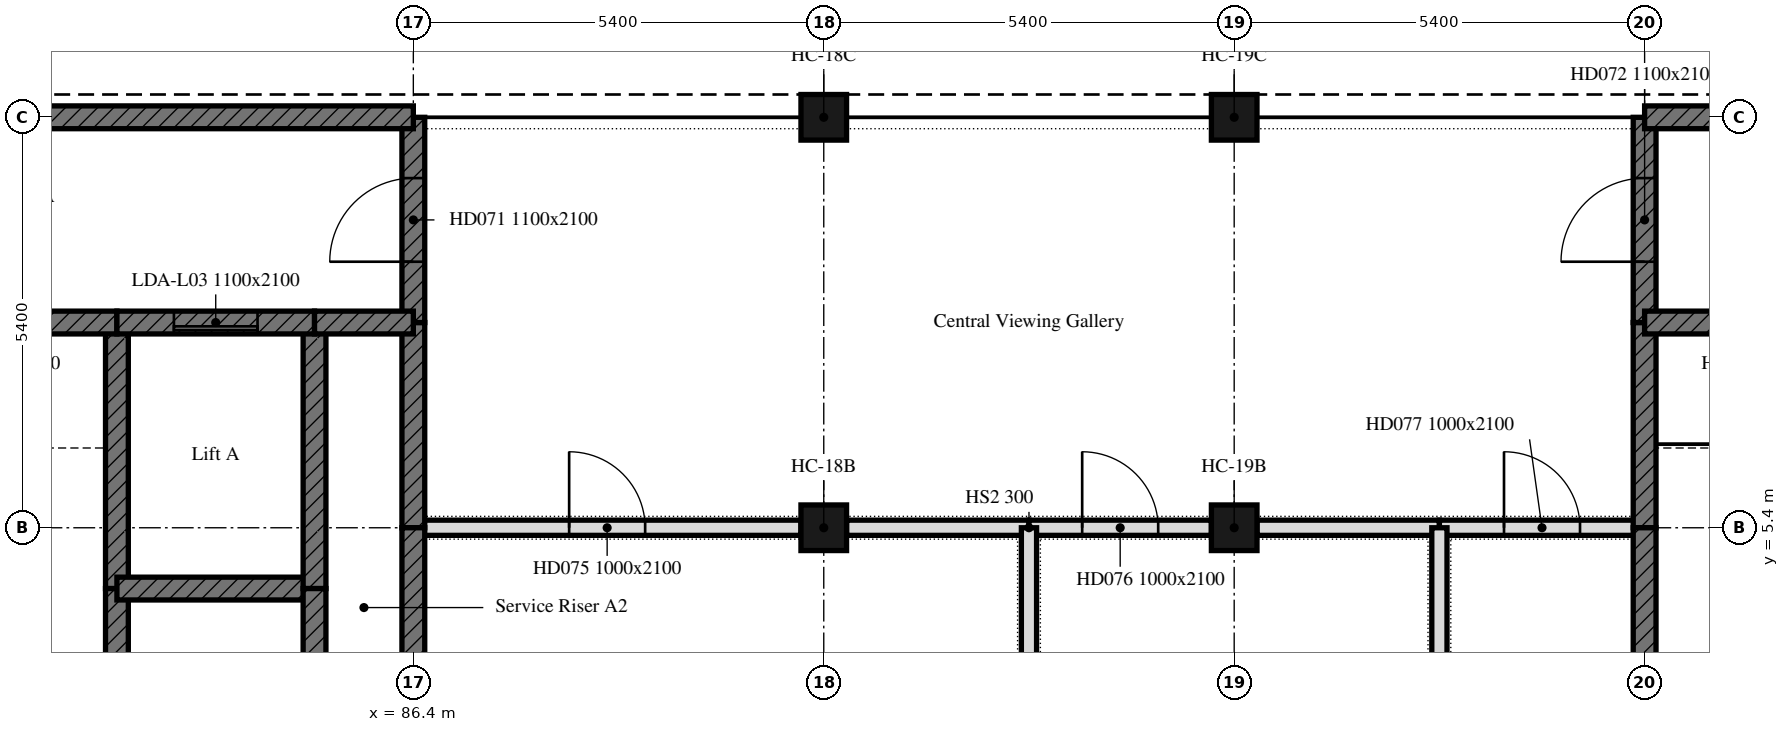
"""IFC4 building model, lengths in metres.
Left out: names, types, materials, properties, quantities, classifications, styles, units other than length and angle.
Written with IfcOpenShell. Run it as: python <this file> out.ifc"""

import sys

from ifc_helpers import new_model, si_unit, direction, frame, frame_2d, origin, origin_2d, place, context, subcontext, project, spatial, polyline, rectangle, outline, extrude, element, fill, save


model = new_model("IFC4")
c1 = context("Model", 3, precision=1e-05, world=origin(), true_north=direction((0.0, 1.0)))
c2 = subcontext(c1, "Body", "Model", "MODEL_VIEW")
j1 = project(units=[si_unit("LENGTHUNIT", "METRE"), si_unit("PLANEANGLEUNIT", "RADIAN")], contexts=[c1])
p1 = place(None, origin())
s1 = spatial("IfcSite", under=j1, at=p1, CompositionType="ELEMENT")
p2 = place(p1, origin())
s2 = spatial("IfcBuilding", under=s1, at=p2, CompositionType="ELEMENT")
p3 = place(p2, frame((0.0, 0.0, 19.8)))
s3 = spatial("IfcBuildingStorey", under=s2, at=p3, CompositionType="ELEMENT", Elevation=19.8)
for number, where, z_axis, x_axis in (
    (1, (91.8, 5.4, 0.0), (0.0, 0.0, 1.0), (1.0, 0.0, 0.0)),
    (2, (91.8, 10.8, 0.0), (0.0, 0.0, 1.0), (1.0, 0.0, 0.0)),
    (3, (97.2, 5.4, 0.0), (0.0, 0.0, 1.0), (1.0, 0.0, 0.0)),
    (4, (97.2, 10.8, 0.0), (0.0, 0.0, 1.0), (1.0, 0.0, 0.0)),
):
    element("IfcColumn", number, at=place(p3, frame(where, z_axis=z_axis, x_axis=x_axis)), inside=s3, PredefinedType="COLUMN", context=c2, shape_type="SweptSolid", body=[
        extrude(rectangle(XDim=0.6, YDim=0.6, at=origin_2d()), origin(), (0.0, 0.0, 1.0), 4.8),
    ])
p4 = place(p3, frame((86.4, 5.4, 0.0), z_axis=(0.0, 0.0, 1.0), x_axis=(1.0, 0.0, 0.0)))
e5 = element("IfcWall", 5, at=p4, inside=s3, PredefinedType="PARTITIONING", context=c2, shape_type="SweptSolid", body=[
    extrude(rectangle(XDim=5.1, YDim=0.2, at=frame_2d((2.55, 0.0))), origin(), (0.0, 0.0, 1.0), 5.317),
])
p5 = place(p4, frame((2.05, 0.0, 0.0)))
e6 = element("IfcOpeningElement", 6, at=p5, cuts=e5, PredefinedType="OPENING", context=c2, shape_type="SweptSolid", body=[
    extrude(rectangle(XDim=1.0, YDim=2.1, at=frame_2d((0.5, 1.05))), frame((0.0, 0.1, 0.0), z_axis=(0.0, -1.0, 0.0), x_axis=(1.0, 0.0, 0.0)), (0.0, 0.0, 1.0), 0.2),
])
p6 = place(p3, frame((92.1, 5.4, 0.0), z_axis=(0.0, 0.0, 1.0), x_axis=(1.0, 0.0, 0.0)))
e7 = element("IfcWall", 7, at=p6, inside=s3, PredefinedType="PARTITIONING", context=c2, shape_type="SweptSolid", body=[
    extrude(rectangle(XDim=2.4, YDim=0.2, at=frame_2d((1.2, 0.0))), origin(), (0.0, 0.0, 1.0), 5.317),
])
p7 = place(p3, frame((94.5, 5.4, 0.0), z_axis=(0.0, 0.0, 1.0), x_axis=(1.0, 0.0, 0.0)))
e8 = element("IfcWall", 8, at=p7, inside=s3, PredefinedType="PARTITIONING", context=c2, shape_type="SweptSolid", body=[
    extrude(rectangle(XDim=2.4, YDim=0.2, at=frame_2d((1.2, 0.0))), origin(), (0.0, 0.0, 1.0), 5.317),
])
p8 = place(p7, frame((0.7, 0.0, 0.0)))
e9 = element("IfcOpeningElement", 9, at=p8, cuts=e8, PredefinedType="OPENING", context=c2, shape_type="SweptSolid", body=[
    extrude(rectangle(XDim=1.0, YDim=2.1, at=frame_2d((0.5, 1.05))), frame((0.0, 0.1, 0.0), z_axis=(0.0, -1.0, 0.0), x_axis=(1.0, 0.0, 0.0)), (0.0, 0.0, 1.0), 0.2),
])
p9 = place(p3, frame((97.5, 5.4, 0.0), z_axis=(0.0, 0.0, 1.0), x_axis=(1.0, 0.0, 0.0)))
e10 = element("IfcWall", 10, at=p9, inside=s3, PredefinedType="PARTITIONING", context=c2, shape_type="SweptSolid", body=[
    extrude(rectangle(XDim=2.4, YDim=0.2, at=frame_2d((1.2, 0.0))), origin(), (0.0, 0.0, 1.0), 5.317),
])
p10 = place(p3, frame((99.9, 5.4, 0.0), z_axis=(0.0, 0.0, 1.0), x_axis=(1.0, 0.0, 0.0)))
e11 = element("IfcWall", 11, at=p10, inside=s3, PredefinedType="PARTITIONING", context=c2, shape_type="SweptSolid", body=[
    extrude(rectangle(XDim=2.7, YDim=0.2, at=frame_2d((1.35, 0.0))), origin(), (0.0, 0.0, 1.0), 5.317),
])
p11 = place(p10, frame((0.85, 0.0, 0.0)))
e12 = element("IfcOpeningElement", 12, at=p11, cuts=e11, PredefinedType="OPENING", context=c2, shape_type="SweptSolid", body=[
    extrude(rectangle(XDim=1.0, YDim=2.1, at=frame_2d((0.5, 1.05))), frame((0.0, 0.1, 0.0), z_axis=(0.0, -1.0, 0.0), x_axis=(1.0, 0.0, 0.0)), (0.0, 0.0, 1.0), 0.2),
])
p12 = place(p3, frame((86.4, 5.4, 0.0), z_axis=(0.0, 0.0, 1.0), x_axis=(0.0, 1.0, 0.0)))
e13 = element("IfcWall", 13, at=p12, inside=s3, PredefinedType="SHEAR", context=c2, shape_type="SweptSolid", body=[
    extrude(outline(polyline([(0.0, 0.0), (2.7, 0.0), (2.7, 6.067), (0.0, 5.344), (0.0, 0.0)])), frame((0.0, 0.15, 0.0), z_axis=(0.0, -1.0, 0.0), x_axis=(1.0, 0.0, 0.0)), (0.0, 0.0, 1.0), 0.3),
])
p13 = place(p3, frame((86.4, 8.1, 0.0), z_axis=(0.0, 0.0, 1.0), x_axis=(0.0, 1.0, 0.0)))
e14 = element("IfcWall", 14, at=p13, inside=s3, PredefinedType="SHEAR", context=c2, shape_type="SweptSolid", body=[
    extrude(outline(polyline([(0.0, 0.0), (2.7, 0.0), (2.7, 6.791), (0.0, 6.067), (0.0, 0.0)])), frame((0.0, 0.15, 0.0), z_axis=(0.0, -1.0, 0.0), x_axis=(1.0, 0.0, 0.0)), (0.0, 0.0, 1.0), 0.3),
])
p14 = place(p13, frame((0.8, 0.0, 0.0)))
e15 = element("IfcOpeningElement", 15, at=p14, cuts=e14, PredefinedType="OPENING", context=c2, shape_type="SweptSolid", body=[
    extrude(rectangle(XDim=1.1, YDim=2.1, at=frame_2d((0.55, 1.05))), frame((0.0, 0.15, 0.0), z_axis=(0.0, -1.0, 0.0), x_axis=(1.0, 0.0, 0.0)), (0.0, 0.0, 1.0), 0.3),
])
p15 = place(p3, frame((102.6, 5.4, 0.0), z_axis=(0.0, 0.0, 1.0), x_axis=(0.0, 1.0, 0.0)))
e16 = element("IfcWall", 16, at=p15, inside=s3, PredefinedType="SHEAR", context=c2, shape_type="SweptSolid", body=[
    extrude(outline(polyline([(0.0, 0.0), (2.7, 0.0), (2.7, 6.067), (0.0, 5.344), (0.0, 0.0)])), frame((0.0, 0.15, 0.0), z_axis=(0.0, -1.0, 0.0), x_axis=(1.0, 0.0, 0.0)), (0.0, 0.0, 1.0), 0.3),
])
p16 = place(p3, frame((102.6, 8.1, 0.0), z_axis=(0.0, 0.0, 1.0), x_axis=(0.0, 1.0, 0.0)))
e17 = element("IfcWall", 17, at=p16, inside=s3, PredefinedType="SHEAR", context=c2, shape_type="SweptSolid", body=[
    extrude(outline(polyline([(0.0, 0.0), (2.7, 0.0), (2.7, 6.791), (0.0, 6.067), (0.0, 0.0)])), frame((0.0, 0.15, 0.0), z_axis=(0.0, -1.0, 0.0), x_axis=(1.0, 0.0, 0.0)), (0.0, 0.0, 1.0), 0.3),
])
p17 = place(p16, frame((0.8, 0.0, 0.0)))
e18 = element("IfcOpeningElement", 18, at=p17, cuts=e17, PredefinedType="OPENING", context=c2, shape_type="SweptSolid", body=[
    extrude(rectangle(XDim=1.1, YDim=2.1, at=frame_2d((0.55, 1.05))), frame((0.0, 0.15, 0.0), z_axis=(0.0, -1.0, 0.0), x_axis=(1.0, 0.0, 0.0)), (0.0, 0.0, 1.0), 0.3),
])
p18 = place(p3, frame((94.5, 0.75, 0.0), z_axis=(0.0, 0.0, 1.0), x_axis=(0.0, 1.0, 0.0)))
e19 = element("IfcWall", 19, at=p18, inside=s3, PredefinedType="PARTITIONING", context=c2, shape_type="SweptSolid", body=[
    extrude(outline(polyline([(0.0, 0.0), (4.65, 0.0), (4.65, 5.344), (0.0, 4.098), (0.0, 0.0)])), frame((0.0, 0.1, 0.0), z_axis=(0.0, -1.0, 0.0), x_axis=(1.0, 0.0, 0.0)), (0.0, 0.0, 1.0), 0.2),
])
p19 = place(p3, frame((86.4, 0.45, 0.0), z_axis=(0.0, 0.0, 1.0), x_axis=(0.0, 1.0, 0.0)))
e20 = element("IfcWall", 20, at=p19, inside=s3, PredefinedType="SHEAR", context=c2, shape_type="SweptSolid", body=[
    extrude(outline(polyline([(0.0, 0.0), (4.95, 0.0), (4.95, 5.344), (0.0, 4.018), (0.0, 0.0)])), frame((0.0, 0.15, 0.0), z_axis=(0.0, -1.0, 0.0), x_axis=(1.0, 0.0, 0.0)), (0.0, 0.0, 1.0), 0.3),
])
p20 = place(p3, frame((99.9, 0.75, 0.0), z_axis=(0.0, 0.0, 1.0), x_axis=(0.0, 1.0, 0.0)))
e21 = element("IfcWall", 21, at=p20, inside=s3, PredefinedType="PARTITIONING", context=c2, shape_type="SweptSolid", body=[
    extrude(outline(polyline([(0.0, 0.0), (4.65, 0.0), (4.65, 5.344), (0.0, 4.098), (0.0, 0.0)])), frame((0.0, 0.1, 0.0), z_axis=(0.0, -1.0, 0.0), x_axis=(1.0, 0.0, 0.0)), (0.0, 0.0, 1.0), 0.2),
])
p21 = place(p3, frame((102.6, 0.45, 0.0), z_axis=(0.0, 0.0, 1.0), x_axis=(0.0, 1.0, 0.0)))
e22 = element("IfcWall", 22, at=p21, inside=s3, PredefinedType="SHEAR", context=c2, shape_type="SweptSolid", body=[
    extrude(outline(polyline([(0.0, 0.0), (4.95, 0.0), (4.95, 5.344), (0.0, 4.018), (0.0, 0.0)])), frame((0.0, 0.15, 0.0), z_axis=(0.0, -1.0, 0.0), x_axis=(1.0, 0.0, 0.0)), (0.0, 0.0, 1.0), 0.3),
])
p22 = place(p3, frame((82.5, 4.6, 0.0), z_axis=(0.0, 0.0, 1.0), x_axis=(0.0, 1.0, 0.0)))
e23 = element("IfcWall", 23, at=p22, inside=s3, PredefinedType="SHEAR", context=c2, shape_type="SweptSolid", body=[
    extrude(outline(polyline([(0.0, 0.0), (3.5, 0.0), (3.5, 6.067), (0.0, 5.13), (0.0, 0.0)])), frame((0.0, 0.15, 0.0), z_axis=(0.0, -1.0, 0.0), x_axis=(1.0, 0.0, 0.0)), (0.0, 0.0, 1.0), 0.3),
])
p23 = place(p3, frame((82.5, 0.75, 0.0), z_axis=(0.0, 0.0, 1.0), x_axis=(0.0, 1.0, 0.0)))
e24 = element("IfcWall", 24, at=p23, inside=s3, PredefinedType="SHEAR", context=c2, shape_type="SweptSolid", body=[
    extrude(outline(polyline([(0.0, 0.0), (3.85, 0.0), (3.85, 5.13), (0.0, 4.098), (0.0, 0.0)])), frame((0.0, 0.15, 0.0), z_axis=(0.0, -1.0, 0.0), x_axis=(1.0, 0.0, 0.0)), (0.0, 0.0, 1.0), 0.3),
])
p24 = place(p3, frame((79.05, 8.1, 0.0), z_axis=(0.0, 0.0, 1.0), x_axis=(1.0, 0.0, 0.0)))
e25 = element("IfcWall", 25, at=p24, inside=s3, PredefinedType="SHEAR", context=c2, shape_type="SweptSolid", body=[
    extrude(rectangle(XDim=3.45, YDim=0.3, at=frame_2d((1.725, 0.0))), origin(), (0.0, 0.0, 1.0), 6.027),
])
p25 = place(p24, frame((1.175, 0.0, 0.0)))
e26 = element("IfcOpeningElement", 26, at=p25, cuts=e25, PredefinedType="OPENING", context=c2, shape_type="SweptSolid", body=[
    extrude(rectangle(XDim=1.1, YDim=2.1, at=frame_2d((0.55, 1.05))), frame((0.0, 0.15, 0.0), z_axis=(0.0, -1.0, 0.0), x_axis=(1.0, 0.0, 0.0)), (0.0, 0.0, 1.0), 0.3),
])
p26 = place(p3, frame((82.5, 4.6, 0.0), z_axis=(0.0, 0.0, 1.0), x_axis=(1.0, 0.0, 0.0)))
e27 = element("IfcWall", 27, at=p26, inside=s3, PredefinedType="SHEAR", context=c2, shape_type="SweptSolid", body=[
    extrude(rectangle(XDim=2.6, YDim=0.3, at=frame_2d((1.3, 0.0))), origin(), (0.0, 0.0, 1.0), 5.089),
])
p27 = place(p3, frame((85.1, 4.6, 0.0), z_axis=(0.0, 0.0, 1.0), x_axis=(0.0, 1.0, 0.0)))
e28 = element("IfcWall", 28, at=p27, inside=s3, PredefinedType="SHEAR", context=c2, shape_type="SweptSolid", body=[
    extrude(outline(polyline([(0.0, 0.0), (3.5, 0.0), (3.5, 6.067), (0.0, 5.13), (0.0, 0.0)])), frame((0.0, 0.15, 0.0), z_axis=(0.0, -1.0, 0.0), x_axis=(1.0, 0.0, 0.0)), (0.0, 0.0, 1.0), 0.3),
])
p28 = place(p3, frame((82.5, 8.1, 0.0), z_axis=(0.0, 0.0, 1.0), x_axis=(1.0, 0.0, 0.0)))
e29 = element("IfcWall", 29, at=p28, inside=s3, PredefinedType="SHEAR", context=c2, shape_type="SweptSolid", body=[
    extrude(rectangle(XDim=2.6, YDim=0.3, at=frame_2d((1.3, 0.0))), origin(), (0.0, 0.0, 1.0), 6.027),
])
p29 = place(p28, frame((0.75, 0.0, 0.0)))
e30 = element("IfcOpeningElement", 30, at=p29, cuts=e29, PredefinedType="OPENING", context=c2, shape_type="SweptSolid", body=[
    extrude(rectangle(XDim=1.1, YDim=2.1, at=frame_2d((0.55, 1.05))), frame((0.0, 0.15, 0.0), z_axis=(0.0, -1.0, 0.0), x_axis=(1.0, 0.0, 0.0)), (0.0, 0.0, 1.0), 0.3),
])
p30 = place(p3, frame((85.1, 0.75, 0.0), z_axis=(0.0, 0.0, 1.0), x_axis=(0.0, 1.0, 0.0)))
e31 = element("IfcWall", 31, at=p30, inside=s3, PredefinedType="SHEAR", context=c2, shape_type="SweptSolid", body=[
    extrude(outline(polyline([(0.0, 0.0), (3.85, 0.0), (3.85, 5.13), (0.0, 4.098), (0.0, 0.0)])), frame((0.0, 0.15, 0.0), z_axis=(0.0, -1.0, 0.0), x_axis=(1.0, 0.0, 0.0)), (0.0, 0.0, 1.0), 0.3),
])
p31 = place(p3, frame((85.1, 8.1, 0.0), z_axis=(0.0, 0.0, 1.0), x_axis=(1.0, 0.0, 0.0)))
e32 = element("IfcWall", 32, at=p31, inside=s3, PredefinedType="SHEAR", context=c2, shape_type="SweptSolid", body=[
    extrude(rectangle(XDim=1.3, YDim=0.3, at=frame_2d((0.65, 0.0))), origin(), (0.0, 0.0, 1.0), 6.027),
])
p32 = place(p3, frame((81.0, 10.8, 0.0), z_axis=(0.0, 0.0, 1.0), x_axis=(1.0, 0.0, 0.0)))
e33 = element("IfcWall", 33, at=p32, inside=s3, PredefinedType="SHEAR", context=c2, shape_type="SweptSolid", body=[
    extrude(rectangle(XDim=5.4, YDim=0.3, at=frame_2d((2.7, 0.0))), origin(), (0.0, 0.0, 1.0), 6.751),
])
p33 = place(p3, frame((102.6, 8.1, 0.0), z_axis=(0.0, 0.0, 1.0), x_axis=(1.0, 0.0, 0.0)))
e34 = element("IfcWall", 34, at=p33, inside=s3, PredefinedType="SHEAR", context=c2, shape_type="SweptSolid", body=[
    extrude(rectangle(XDim=3.45, YDim=0.3, at=frame_2d((1.725, 0.0))), origin(), (0.0, 0.0, 1.0), 6.027),
])
p34 = place(p33, frame((1.175, 0.0, 0.0)))
e35 = element("IfcOpeningElement", 35, at=p34, cuts=e34, PredefinedType="OPENING", context=c2, shape_type="SweptSolid", body=[
    extrude(rectangle(XDim=1.1, YDim=2.1, at=frame_2d((0.55, 1.05))), frame((0.0, 0.15, 0.0), z_axis=(0.0, -1.0, 0.0), x_axis=(1.0, 0.0, 0.0)), (0.0, 0.0, 1.0), 0.3),
])
p35 = place(p3, frame((102.6, 10.8, 0.0), z_axis=(0.0, 0.0, 1.0), x_axis=(1.0, 0.0, 0.0)))
e36 = element("IfcWall", 36, at=p35, inside=s3, PredefinedType="SHEAR", context=c2, shape_type="SweptSolid", body=[
    extrude(rectangle(XDim=10.8, YDim=0.3, at=frame_2d((5.4, 0.0))), origin(), (0.0, 0.0, 1.0), 6.751),
])
p36 = place(p14, origin())
e37 = element("IfcDoor", 37, at=p36, inside=s3, OperationType="SINGLE_SWING_LEFT", PredefinedType="DOOR", context=c2, shape_type="SweptSolid", body=[
    extrude(rectangle(XDim=1.1, YDim=2.1, at=frame_2d((0.55, 1.05))), frame((0.0, 0.025, 0.0), z_axis=(0.0, -1.0, 0.0), x_axis=(1.0, 0.0, 0.0)), (0.0, 0.0, 1.0), 0.05),
])
fill(e15, e37)
p37 = place(p17, origin())
e38 = element("IfcDoor", 38, at=p37, inside=s3, OperationType="SINGLE_SWING_LEFT", PredefinedType="DOOR", context=c2, shape_type="SweptSolid", body=[
    extrude(rectangle(XDim=1.1, YDim=2.1, at=frame_2d((0.55, 1.05))), frame((0.0, 0.025, 0.0), z_axis=(0.0, -1.0, 0.0), x_axis=(1.0, 0.0, 0.0)), (0.0, 0.0, 1.0), 0.05),
])
fill(e18, e38)
p38 = place(p5, origin())
e39 = element("IfcDoor", 39, at=p38, inside=s3, OperationType="SINGLE_SWING_LEFT", PredefinedType="DOOR", context=c2, shape_type="SweptSolid", body=[
    extrude(rectangle(XDim=1.0, YDim=2.1, at=frame_2d((0.5, 1.05))), frame((0.0, 0.025, 0.0), z_axis=(0.0, -1.0, 0.0), x_axis=(1.0, 0.0, 0.0)), (0.0, 0.0, 1.0), 0.05),
])
fill(e6, e39)
p39 = place(p8, origin())
e40 = element("IfcDoor", 40, at=p39, inside=s3, OperationType="SINGLE_SWING_LEFT", PredefinedType="DOOR", context=c2, shape_type="SweptSolid", body=[
    extrude(rectangle(XDim=1.0, YDim=2.1, at=frame_2d((0.5, 1.05))), frame((0.0, 0.025, 0.0), z_axis=(0.0, -1.0, 0.0), x_axis=(1.0, 0.0, 0.0)), (0.0, 0.0, 1.0), 0.05),
])
fill(e9, e40)
p40 = place(p11, origin())
e41 = element("IfcDoor", 41, at=p40, inside=s3, OperationType="SINGLE_SWING_LEFT", PredefinedType="DOOR", context=c2, shape_type="SweptSolid", body=[
    extrude(rectangle(XDim=1.0, YDim=2.1, at=frame_2d((0.5, 1.05))), frame((0.0, 0.025, 0.0), z_axis=(0.0, -1.0, 0.0), x_axis=(1.0, 0.0, 0.0)), (0.0, 0.0, 1.0), 0.05),
])
fill(e12, e41)
p41 = place(p29, origin())
e42 = element("IfcDoor", 42, at=p41, inside=s3, OperationType="SLIDING_TO_LEFT", PredefinedType="DOOR", context=c2, shape_type="SweptSolid", body=[
    extrude(rectangle(XDim=1.1, YDim=2.1, at=frame_2d((0.55, 1.05))), frame((0.0, 0.025, 0.0), z_axis=(0.0, -1.0, 0.0), x_axis=(1.0, 0.0, 0.0)), (0.0, 0.0, 1.0), 0.05),
])
fill(e30, e42)
save(model, sys.argv[1])
